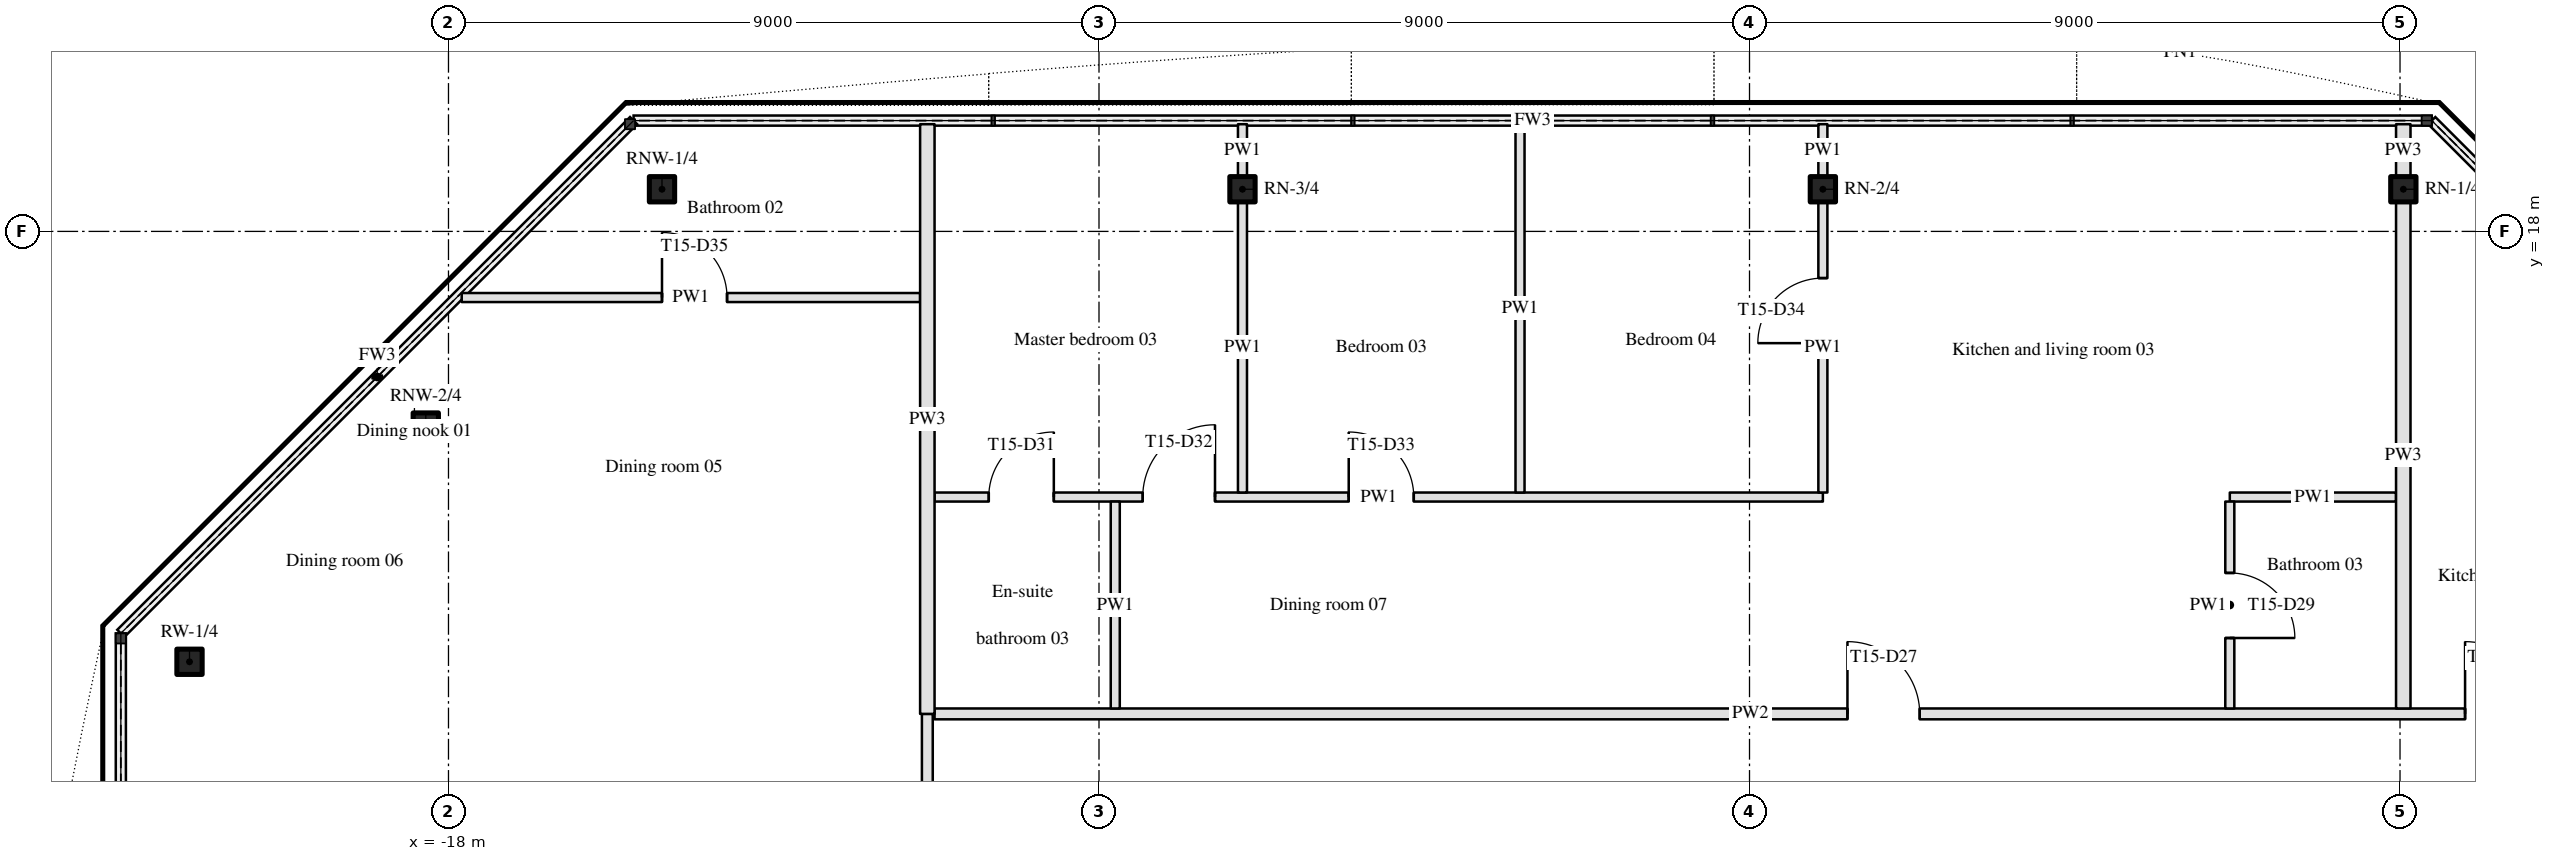
"""IFC4 building model, lengths in metres.
Left out: names, types, materials, properties, quantities, classifications, styles, units other than length and angle.
Written with IfcOpenShell. Run it as: python <this file> out.ifc"""

import sys

from ifc_helpers import new_model, si_unit, direction, frame, frame_2d, origin, origin_2d, place, context, subcontext, project, spatial, rectangle, hollow_rectangle, extrude, element, fill, save


model = new_model("IFC4")
c1 = context("Model", 3, precision=1e-05, world=origin(), true_north=direction((0.0, 1.0)))
c2 = subcontext(c1, "Body", "Model", "MODEL_VIEW")
j1 = project(units=[si_unit("LENGTHUNIT", "METRE"), si_unit("PLANEANGLEUNIT", "RADIAN")], contexts=[c1])
p1 = place(None, origin())
s1 = spatial("IfcSite", under=j1, at=p1, CompositionType="ELEMENT")
p2 = place(p1, origin())
s2 = spatial("IfcBuilding", under=s1, at=p2, CompositionType="ELEMENT")
p3 = place(p2, frame((0.0, 0.0, 206.85)))
s3 = spatial("IfcBuildingStorey", under=s2, at=p3, CompositionType="ELEMENT", Elevation=206.85)
for number, where, z_axis, x_axis in (
    (1, (9.046, 18.583, 0.0), (0.0, 0.0, 1.0), (1.0, 0.0, 0.0)),
    (2, (1.015, 18.583, 0.0), (0.0, 0.0, 1.0), (1.0, 0.0, 0.0)),
    (3, (-7.015, 18.583, 0.0), (0.0, 0.0, 1.0), (1.0, 0.0, 0.0)),
    (4, (-15.046, 18.583, 0.0), (0.0, 0.0, 1.0), (1.0, 0.0, 0.0)),
    (5, (-18.314, 15.314, 0.0), (0.0, 0.0, 1.0), (1.0, 0.0, 0.0)),
    (6, (-21.583, 12.046, 0.0), (0.0, 0.0, 1.0), (1.0, 0.0, 0.0)),
):
    element("IfcColumn", number, at=place(p3, frame(where, z_axis=z_axis, x_axis=x_axis)), inside=s3, PredefinedType="COLUMN", context=c2, shape_type="SweptSolid", body=[
        extrude(hollow_rectangle(XDim=0.35, YDim=0.35, WallThickness=0.02, InnerFilletRadius=0.03, OuterFilletRadius=0.05, at=origin_2d()), origin(), (0.0, 0.0, 1.0), 3.15),
    ])
p4 = place(p3, frame((-11.275, 11.325, 0.0), z_axis=(0.0, 0.0, 1.0), x_axis=(1.0, 0.0, 0.0)))
e7 = element("IfcWall", 7, at=p4, inside=s3, PredefinedType="PARTITIONING", context=c2, shape_type="SweptSolid", body=[
    extrude(rectangle(XDim=22.575, YDim=0.15, at=frame_2d((11.288, 0.0))), origin(), (0.0, 0.0, 1.0), 2.21),
])
p5 = place(p4, frame((12.63, 0.0, 0.0)))
e8 = element("IfcOpeningElement", 8, at=p5, cuts=e7, PredefinedType="OPENING", context=c2, shape_type="SweptSolid", body=[
    extrude(rectangle(XDim=1.0, YDim=2.1, at=frame_2d((0.5, 1.05))), frame((0.0, 0.085, 0.0), z_axis=(0.0, -1.0, 0.0), x_axis=(1.0, 0.0, 0.0)), (0.0, 0.0, 1.0), 0.17),
])
p6 = place(p4, frame((21.175, 0.0, 0.0)))
e9 = element("IfcOpeningElement", 9, at=p6, cuts=e7, PredefinedType="OPENING", context=c2, shape_type="SweptSolid", body=[
    extrude(rectangle(XDim=1.0, YDim=2.1, at=frame_2d((0.5, 1.05))), frame((0.0, 0.085, 0.0), z_axis=(0.0, -1.0, 0.0), x_axis=(1.0, 0.0, 0.0)), (0.0, 0.0, 1.0), 0.17),
])
p7 = place(p3, frame((-11.275, 14.325, 0.0), z_axis=(0.0, 0.0, 1.0), x_axis=(1.0, 0.0, 0.0)))
e10 = element("IfcWall", 10, at=p7, inside=s3, PredefinedType="PARTITIONING", context=c2, shape_type="SweptSolid", body=[
    extrude(rectangle(XDim=12.29, YDim=0.125, at=frame_2d((6.145, 0.0))), origin(), (0.0, 0.0, 1.0), 2.21),
])
p8 = place(p7, frame((5.73, 0.0, 0.0)))
e11 = element("IfcOpeningElement", 11, at=p8, cuts=e10, PredefinedType="OPENING", context=c2, shape_type="SweptSolid", body=[
    extrude(rectangle(XDim=0.9, YDim=2.1, at=frame_2d((0.45, 1.05))), frame((0.0, 0.073, 0.0), z_axis=(0.0, -1.0, 0.0), x_axis=(1.0, 0.0, 0.0)), (0.0, 0.0, 1.0), 0.145),
])
p9 = place(p7, frame((2.88, 0.0, 0.0)))
e12 = element("IfcOpeningElement", 12, at=p9, cuts=e10, PredefinedType="OPENING", context=c2, shape_type="SweptSolid", body=[
    extrude(rectangle(XDim=1.0, YDim=2.1, at=frame_2d((0.5, 1.05))), frame((0.0, 0.073, 0.0), z_axis=(0.0, -1.0, 0.0), x_axis=(1.0, 0.0, 0.0)), (0.0, 0.0, 1.0), 0.145),
])
p10 = place(p7, frame((0.75, 0.0, 0.0)))
e13 = element("IfcOpeningElement", 13, at=p10, cuts=e10, PredefinedType="OPENING", context=c2, shape_type="SweptSolid", body=[
    extrude(rectangle(XDim=0.9, YDim=2.1, at=frame_2d((0.45, 1.05))), frame((0.0, 0.073, 0.0), z_axis=(0.0, -1.0, 0.0), x_axis=(1.0, 0.0, 0.0)), (0.0, 0.0, 1.0), 0.145),
])
p11 = place(p3, frame((6.645, 14.325, 0.0), z_axis=(0.0, 0.0, 1.0), x_axis=(1.0, 0.0, 0.0)))
e14 = element("IfcWall", 14, at=p11, inside=s3, PredefinedType="PARTITIONING", context=c2, shape_type="SweptSolid", body=[
    extrude(rectangle(XDim=2.3, YDim=0.125, at=frame_2d((1.15, 0.0))), origin(), (0.0, 0.0, 1.0), 2.21),
])
p12 = place(p3, frame((-17.817, 17.085, 0.0), z_axis=(0.0, 0.0, 1.0), x_axis=(1.0, 0.0, 0.0)))
e15 = element("IfcWall", 15, at=p12, inside=s3, PredefinedType="PARTITIONING", context=c2, shape_type="SweptSolid", body=[
    extrude(rectangle(XDim=6.342, YDim=0.125, at=frame_2d((3.171, 0.0))), origin(), (0.0, 0.0, 1.0), 2.21),
])
p13 = place(p12, frame((2.771, 0.0, 0.0)))
e16 = element("IfcOpeningElement", 16, at=p13, cuts=e15, PredefinedType="OPENING", context=c2, shape_type="SweptSolid", body=[
    extrude(rectangle(XDim=0.9, YDim=2.1, at=frame_2d((0.45, 1.05))), frame((0.0, 0.073, 0.0), z_axis=(0.0, -1.0, 0.0), x_axis=(1.0, 0.0, 0.0)), (0.0, 0.0, 1.0), 0.145),
])
p14 = place(p3, frame((-11.375, -11.925, 0.0), z_axis=(0.0, 0.0, 1.0), x_axis=(0.0, 1.0, 0.0)))
e17 = element("IfcWall", 17, at=p14, inside=s3, PredefinedType="PARTITIONING", context=c2, shape_type="SweptSolid", body=[
    extrude(rectangle(XDim=23.25, YDim=0.15, at=frame_2d((11.625, 0.0))), origin(), (0.0, 0.0, 1.0), 2.21),
])
p15 = place(p14, frame((1.262, 0.0, 0.0)))
e18 = element("IfcOpeningElement", 18, at=p15, cuts=e17, PredefinedType="OPENING", context=c2, shape_type="SweptSolid", body=[
    extrude(rectangle(XDim=1.0, YDim=2.1, at=frame_2d((0.5, 1.05))), frame((0.0, 0.085, 0.0), z_axis=(0.0, -1.0, 0.0), x_axis=(1.0, 0.0, 0.0)), (0.0, 0.0, 1.0), 0.17),
])
p16 = place(p14, frame((18.583, 0.0, 0.0)))
e19 = element("IfcOpeningElement", 19, at=p16, cuts=e17, PredefinedType="OPENING", context=c2, shape_type="SweptSolid", body=[
    extrude(rectangle(XDim=1.0, YDim=2.1, at=frame_2d((0.5, 1.05))), frame((0.0, 0.085, 0.0), z_axis=(0.0, -1.0, 0.0), x_axis=(1.0, 0.0, 0.0)), (0.0, 0.0, 1.0), 0.17),
])
p17 = place(p3, frame((-11.375, 11.325, 0.0), z_axis=(0.0, 0.0, 1.0), x_axis=(0.0, 1.0, 0.0)))
e20 = element("IfcWall", 20, at=p17, inside=s3, PredefinedType="PARTITIONING", context=c2, shape_type="SweptSolid", body=[
    extrude(rectangle(XDim=8.158, YDim=0.2, at=frame_2d((4.079, 0.0))), origin(), (0.0, 0.0, 1.0), 2.21),
])
p18 = place(p3, frame((-8.775, 11.4, 0.0), z_axis=(0.0, 0.0, 1.0), x_axis=(0.0, 1.0, 0.0)))
e21 = element("IfcWall", 21, at=p18, inside=s3, PredefinedType="PARTITIONING", context=c2, shape_type="SweptSolid", body=[
    extrude(rectangle(XDim=2.863, YDim=0.125, at=frame_2d((1.431, 0.0))), origin(), (0.0, 0.0, 1.0), 2.21),
])
p19 = place(p3, frame((-7.015, 14.387, 0.0), z_axis=(0.0, 0.0, 1.0), x_axis=(0.0, 1.0, 0.0)))
e22 = element("IfcWall", 22, at=p19, inside=s3, PredefinedType="PARTITIONING", context=c2, shape_type="SweptSolid", body=[
    extrude(rectangle(XDim=4.021, YDim=0.125, at=frame_2d((2.01, 0.0))), origin(), (0.0, 0.0, 1.0), 2.21),
])
p20 = place(p3, frame((-7.015, 18.758, 0.0), z_axis=(0.0, 0.0, 1.0), x_axis=(0.0, 1.0, 0.0)))
e23 = element("IfcWall", 23, at=p20, inside=s3, PredefinedType="PARTITIONING", context=c2, shape_type="SweptSolid", body=[
    extrude(rectangle(XDim=0.725, YDim=0.125, at=frame_2d((0.362, 0.0))), origin(), (0.0, 0.0, 1.0), 2.21),
])
p21 = place(p3, frame((-3.175, 14.387, 0.0), z_axis=(0.0, 0.0, 1.0), x_axis=(0.0, 1.0, 0.0)))
e24 = element("IfcWall", 24, at=p21, inside=s3, PredefinedType="PARTITIONING", context=c2, shape_type="SweptSolid", body=[
    extrude(rectangle(XDim=5.095, YDim=0.125, at=frame_2d((2.548, 0.0))), origin(), (0.0, 0.0, 1.0), 2.21),
])
p22 = place(p3, frame((1.015, 14.387, 0.0), z_axis=(0.0, 0.0, 1.0), x_axis=(0.0, 1.0, 0.0)))
e25 = element("IfcWall", 25, at=p22, inside=s3, PredefinedType="PARTITIONING", context=c2, shape_type="SweptSolid", body=[
    extrude(rectangle(XDim=4.021, YDim=0.125, at=frame_2d((2.01, 0.0))), origin(), (0.0, 0.0, 1.0), 2.21),
])
p23 = place(p22, frame((2.066, 0.0, 0.0)))
e26 = element("IfcOpeningElement", 26, at=p23, cuts=e25, PredefinedType="OPENING", context=c2, shape_type="SweptSolid", body=[
    extrude(rectangle(XDim=0.9, YDim=2.1, at=frame_2d((0.45, 1.05))), frame((0.0, 0.073, 0.0), z_axis=(0.0, -1.0, 0.0), x_axis=(1.0, 0.0, 0.0)), (0.0, 0.0, 1.0), 0.145),
])
p24 = place(p3, frame((1.015, 18.758, 0.0), z_axis=(0.0, 0.0, 1.0), x_axis=(0.0, 1.0, 0.0)))
e27 = element("IfcWall", 27, at=p24, inside=s3, PredefinedType="PARTITIONING", context=c2, shape_type="SweptSolid", body=[
    extrude(rectangle(XDim=0.725, YDim=0.125, at=frame_2d((0.362, 0.0))), origin(), (0.0, 0.0, 1.0), 2.21),
])
p25 = place(p3, frame((6.645, 14.262, 0.0), z_axis=(0.0, 0.0, 1.0), x_axis=(0.0, -1.0, 0.0)))
e28 = element("IfcWall", 28, at=p25, inside=s3, PredefinedType="PARTITIONING", context=c2, shape_type="SweptSolid", body=[
    extrude(rectangle(XDim=2.863, YDim=0.125, at=frame_2d((1.431, 0.0))), origin(), (0.0, 0.0, 1.0), 2.21),
])
p26 = place(p25, frame((0.988, 0.0, 0.0)))
e29 = element("IfcOpeningElement", 29, at=p26, cuts=e28, PredefinedType="OPENING", context=c2, shape_type="SweptSolid", body=[
    extrude(rectangle(XDim=0.9, YDim=2.1, at=frame_2d((0.45, 1.05))), frame((0.0, 0.073, 0.0), z_axis=(0.0, -1.0, 0.0), x_axis=(1.0, 0.0, 0.0)), (0.0, 0.0, 1.0), 0.145),
])
p27 = place(p3, frame((9.045, 11.4, 0.0), z_axis=(0.0, 0.0, 1.0), x_axis=(0.0, 1.0, 0.0)))
e30 = element("IfcWall", 30, at=p27, inside=s3, PredefinedType="PARTITIONING", context=c2, shape_type="SweptSolid", body=[
    extrude(rectangle(XDim=7.008, YDim=0.2, at=frame_2d((3.504, 0.0))), origin(), (0.0, 0.0, 1.0), 2.21),
])
p28 = place(p3, frame((9.045, 18.758, 0.0), z_axis=(0.0, 0.0, 1.0), x_axis=(0.0, 1.0, 0.0)))
e31 = element("IfcWall", 31, at=p28, inside=s3, PredefinedType="PARTITIONING", context=c2, shape_type="SweptSolid", body=[
    extrude(rectangle(XDim=0.725, YDim=0.2, at=frame_2d((0.362, 0.0))), origin(), (0.0, 0.0, 1.0), 2.21),
])
p29 = place(p5, origin())
e32 = element("IfcDoor", 32, at=p29, inside=s3, OperationType="SINGLE_SWING_LEFT", PredefinedType="DOOR", context=c2, shape_type="SweptSolid", body=[
    extrude(rectangle(XDim=1.0, YDim=2.1, at=frame_2d((0.5, 1.05))), frame((0.0, 0.025, 0.0), z_axis=(0.0, -1.0, 0.0), x_axis=(1.0, 0.0, 0.0)), (0.0, 0.0, 1.0), 0.05),
])
fill(e8, e32)
p30 = place(p6, origin())
e33 = element("IfcDoor", 33, at=p30, inside=s3, OperationType="SINGLE_SWING_LEFT", PredefinedType="DOOR", context=c2, shape_type="SweptSolid", body=[
    extrude(rectangle(XDim=1.0, YDim=2.1, at=frame_2d((0.5, 1.05))), frame((0.0, 0.025, 0.0), z_axis=(0.0, -1.0, 0.0), x_axis=(1.0, 0.0, 0.0)), (0.0, 0.0, 1.0), 0.05),
])
fill(e9, e33)
p31 = place(p13, origin())
e34 = element("IfcDoor", 34, at=p31, inside=s3, OperationType="SINGLE_SWING_LEFT", PredefinedType="DOOR", context=c2, shape_type="SweptSolid", body=[
    extrude(rectangle(XDim=0.9, YDim=2.1, at=frame_2d((0.45, 1.05))), frame((0.0, 0.025, 0.0), z_axis=(0.0, -1.0, 0.0), x_axis=(1.0, 0.0, 0.0)), (0.0, 0.0, 1.0), 0.05),
])
fill(e16, e34)
p32 = place(p8, origin())
e35 = element("IfcDoor", 35, at=p32, inside=s3, OperationType="SINGLE_SWING_LEFT", PredefinedType="DOOR", context=c2, shape_type="SweptSolid", body=[
    extrude(rectangle(XDim=0.9, YDim=2.1, at=frame_2d((0.45, 1.05))), frame((0.0, 0.025, 0.0), z_axis=(0.0, -1.0, 0.0), x_axis=(1.0, 0.0, 0.0)), (0.0, 0.0, 1.0), 0.05),
])
fill(e11, e35)
p33 = place(p9, origin())
e36 = element("IfcDoor", 36, at=p33, inside=s3, OperationType="SINGLE_SWING_RIGHT", PredefinedType="DOOR", context=c2, shape_type="SweptSolid", body=[
    extrude(rectangle(XDim=1.0, YDim=2.1, at=frame_2d((0.5, 1.05))), frame((0.0, 0.025, 0.0), z_axis=(0.0, -1.0, 0.0), x_axis=(1.0, 0.0, 0.0)), (0.0, 0.0, 1.0), 0.05),
])
fill(e12, e36)
p34 = place(p26, origin())
e37 = element("IfcDoor", 37, at=p34, inside=s3, OperationType="SINGLE_SWING_RIGHT", PredefinedType="DOOR", context=c2, shape_type="SweptSolid", body=[
    extrude(rectangle(XDim=0.9, YDim=2.1, at=frame_2d((0.45, 1.05))), frame((0.0, 0.025, 0.0), z_axis=(0.0, -1.0, 0.0), x_axis=(1.0, 0.0, 0.0)), (0.0, 0.0, 1.0), 0.05),
])
fill(e29, e37)
p35 = place(p23, origin())
e38 = element("IfcDoor", 38, at=p35, inside=s3, OperationType="SINGLE_SWING_LEFT", PredefinedType="DOOR", context=c2, shape_type="SweptSolid", body=[
    extrude(rectangle(XDim=0.9, YDim=2.1, at=frame_2d((0.45, 1.05))), frame((0.0, 0.025, 0.0), z_axis=(0.0, -1.0, 0.0), x_axis=(1.0, 0.0, 0.0)), (0.0, 0.0, 1.0), 0.05),
])
fill(e26, e38)
p36 = place(p10, origin())
e39 = element("IfcDoor", 39, at=p36, inside=s3, OperationType="SINGLE_SWING_RIGHT", PredefinedType="DOOR", context=c2, shape_type="SweptSolid", body=[
    extrude(rectangle(XDim=0.9, YDim=2.1, at=frame_2d((0.45, 1.05))), frame((0.0, 0.025, 0.0), z_axis=(0.0, -1.0, 0.0), x_axis=(1.0, 0.0, 0.0)), (0.0, 0.0, 1.0), 0.05),
])
fill(e13, e39)
save(model, sys.argv[1])
